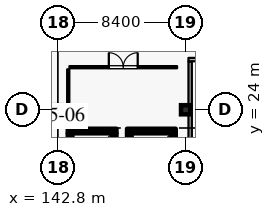
"""IFC4 building model, lengths in metres.
Left out: names, types, materials, properties, quantities, classifications, styles, units other than length and angle.
Written with IfcOpenShell. Run it as: python <this file> out.ifc"""

import sys

from ifc_helpers import new_model, si_unit, direction, frame, frame_2d, origin, origin_2d, place, context, subcontext, project, spatial, rectangle, extrude, element, fill, save


model = new_model("IFC4")
c1 = context("Model", 3, precision=1e-05, world=origin(), true_north=direction((0.0, 1.0)))
c2 = subcontext(c1, "Body", "Model", "MODEL_VIEW")
j1 = project(units=[si_unit("LENGTHUNIT", "METRE"), si_unit("PLANEANGLEUNIT", "RADIAN")], contexts=[c1])
p1 = place(None, origin())
s1 = spatial("IfcSite", under=j1, at=p1, CompositionType="ELEMENT")
p2 = place(p1, origin())
s2 = spatial("IfcBuilding", under=s1, at=p2, CompositionType="ELEMENT")
p3 = place(p2, frame((0.0, 0.0, 43.2)))
s3 = spatial("IfcBuildingStorey", under=s2, at=p3, CompositionType="ELEMENT", Elevation=43.2)
for number, where, z_axis, x_axis in (
    (1, (151.2, 24.0, 0.0), (0.0, 0.0, 1.0), (1.0, 0.0, 0.0)),
    (2, (142.8, 24.0, 0.0), (0.0, 0.0, 1.0), (1.0, 0.0, 0.0)),
):
    element("IfcColumn", number, at=place(p3, frame(where, z_axis=z_axis, x_axis=x_axis)), inside=s3, PredefinedType="COLUMN", context=c2, shape_type="SweptSolid", body=[
        extrude(rectangle(XDim=0.6, YDim=0.6, at=origin_2d()), origin(), (0.0, 0.0, 1.0), 4.2),
    ])
p4 = place(p3, frame((146.5, 19.755, 0.0), z_axis=(0.0, 0.0, 1.0), x_axis=(0.0, 1.0, 0.0)))
e3 = element("IfcWall", 3, at=p4, inside=s3, PredefinedType="SHEAR", context=c2, shape_type="SweptSolid", body=[
    extrude(rectangle(XDim=2.69, YDim=0.3, at=frame_2d((1.345, 0.0))), origin(), (0.0, 0.0, 1.0), 3.935),
])
p5 = place(p3, frame((146.65, 22.6, 0.0), z_axis=(0.0, 0.0, 1.0), x_axis=(-1.0, 0.0, 0.0)))
e4 = element("IfcWall", 4, at=p5, inside=s3, PredefinedType="SHEAR", context=c2, shape_type="SweptSolid", body=[
    extrude(rectangle(XDim=3.2, YDim=0.3, at=frame_2d((1.6, 0.0))), origin(), (0.0, 0.0, 1.0), 3.935),
])
for number, where, z_axis, x_axis in (
    (5, (143.6, 22.445, 0.0), (0.0, 0.0, 1.0), (0.0, -1.0, 0.0)),
    (6, (150.4, 19.755, 0.0), (0.0, 0.0, 1.0), (0.0, 1.0, 0.0)),
):
    element("IfcWall", number, at=place(p3, frame(where, z_axis=z_axis, x_axis=x_axis)), inside=s3, PredefinedType="SHEAR", context=c2, shape_type="SweptSolid", body=[
        extrude(rectangle(XDim=2.69, YDim=0.3, at=frame_2d((1.345, 0.0))), origin(), (0.0, 0.0, 1.0), 3.935),
    ])
p6 = place(p3, frame((150.55, 22.6, 0.0), z_axis=(0.0, 0.0, 1.0), x_axis=(-1.0, 0.0, 0.0)))
e7 = element("IfcWall", 7, at=p6, inside=s3, PredefinedType="SHEAR", context=c2, shape_type="SweptSolid", body=[
    extrude(rectangle(XDim=3.2, YDim=0.3, at=frame_2d((1.6, 0.0))), origin(), (0.0, 0.0, 1.0), 3.935),
])
p7 = place(p3, frame((147.5, 22.445, 0.0), z_axis=(0.0, 0.0, 1.0), x_axis=(0.0, -1.0, 0.0)))
e8 = element("IfcWall", 8, at=p7, inside=s3, PredefinedType="SHEAR", context=c2, shape_type="SweptSolid", body=[
    extrude(rectangle(XDim=2.69, YDim=0.3, at=frame_2d((1.345, 0.0))), origin(), (0.0, 0.0, 1.0), 3.935),
])
p8 = place(p3, frame((151.5, 21.365, 0.0), z_axis=(0.0, 0.0, 1.0), x_axis=(0.0, 1.0, 0.0)))
e9 = element("IfcWall", 9, at=p8, inside=s3, PredefinedType="PARTITIONING", context=c2, shape_type="SweptSolid", body=[
    extrude(rectangle(XDim=5.82, YDim=0.22, at=frame_2d((2.91, 0.0))), origin(), (0.0, 0.0, 1.0), 3.935),
])
p9 = place(p3, frame((151.39, 27.3, 0.0), z_axis=(0.0, 0.0, 1.0), x_axis=(1.0, 0.0, 0.0)))
e10 = element("IfcWall", 10, at=p9, inside=s3, PredefinedType="PARTITIONING", context=c2, shape_type="SweptSolid", body=[
    extrude(rectangle(XDim=3.82, YDim=0.22, at=frame_2d((1.91, 0.0))), origin(), (0.0, 0.0, 1.0), 3.935),
])
p10 = place(p9, frame((1.35, 0.0, 0.0)))
e11 = element("IfcOpeningElement", 11, at=p10, cuts=e10, PredefinedType="OPENING", context=c2, shape_type="SweptSolid", body=[
    extrude(rectangle(XDim=1.12, YDim=2.2, at=frame_2d((0.56, 1.1))), frame((0.0, 0.12, 0.0), z_axis=(0.0, -1.0, 0.0), x_axis=(1.0, 0.0, 0.0)), (0.0, 0.0, 1.0), 0.24),
])
p11 = place(p3, frame((143.56, 26.8, 0.0), z_axis=(0.0, 0.0, 1.0), x_axis=(1.0, 0.0, 0.0)))
e12 = element("IfcWall", 12, at=p11, inside=s3, PredefinedType="PARTITIONING", context=c2, shape_type="SweptSolid", body=[
    extrude(rectangle(XDim=7.08, YDim=0.14, at=frame_2d((3.54, 0.0))), origin(), (0.0, 0.0, 1.0), 3.935),
])
p12 = place(p11, frame((2.59, 0.0, 0.0)))
e13 = element("IfcOpeningElement", 13, at=p12, cuts=e12, PredefinedType="OPENING", context=c2, shape_type="SweptSolid", body=[
    extrude(rectangle(XDim=1.9, YDim=2.4, at=frame_2d((0.95, 1.2))), frame((0.0, 0.08, 0.0), z_axis=(0.0, -1.0, 0.0), x_axis=(1.0, 0.0, 0.0)), (0.0, 0.0, 1.0), 0.16),
])
p13 = place(p3, frame((143.48, 23.45, 0.0), z_axis=(0.0, 0.0, 1.0), x_axis=(0.0, 1.0, 0.0)))
e14 = element("IfcWall", 14, at=p13, inside=s3, PredefinedType="PARTITIONING", context=c2, shape_type="SweptSolid", body=[
    extrude(rectangle(XDim=3.21, YDim=0.14, at=frame_2d((1.605, 0.0))), origin(), (0.0, 0.0, 1.0), 3.935),
])
p14 = place(p12, origin())
e15 = element("IfcDoor", 15, at=p14, inside=s3, OperationType="DOUBLE_DOOR_SINGLE_SWING", PredefinedType="DOOR", context=c2, shape_type="SweptSolid", body=[
    extrude(rectangle(XDim=1.9, YDim=2.4, at=frame_2d((0.95, 1.2))), frame((0.0, 0.025, 0.0), z_axis=(0.0, -1.0, 0.0), x_axis=(1.0, 0.0, 0.0)), (0.0, 0.0, 1.0), 0.05),
])
fill(e13, e15)
save(model, sys.argv[1])
